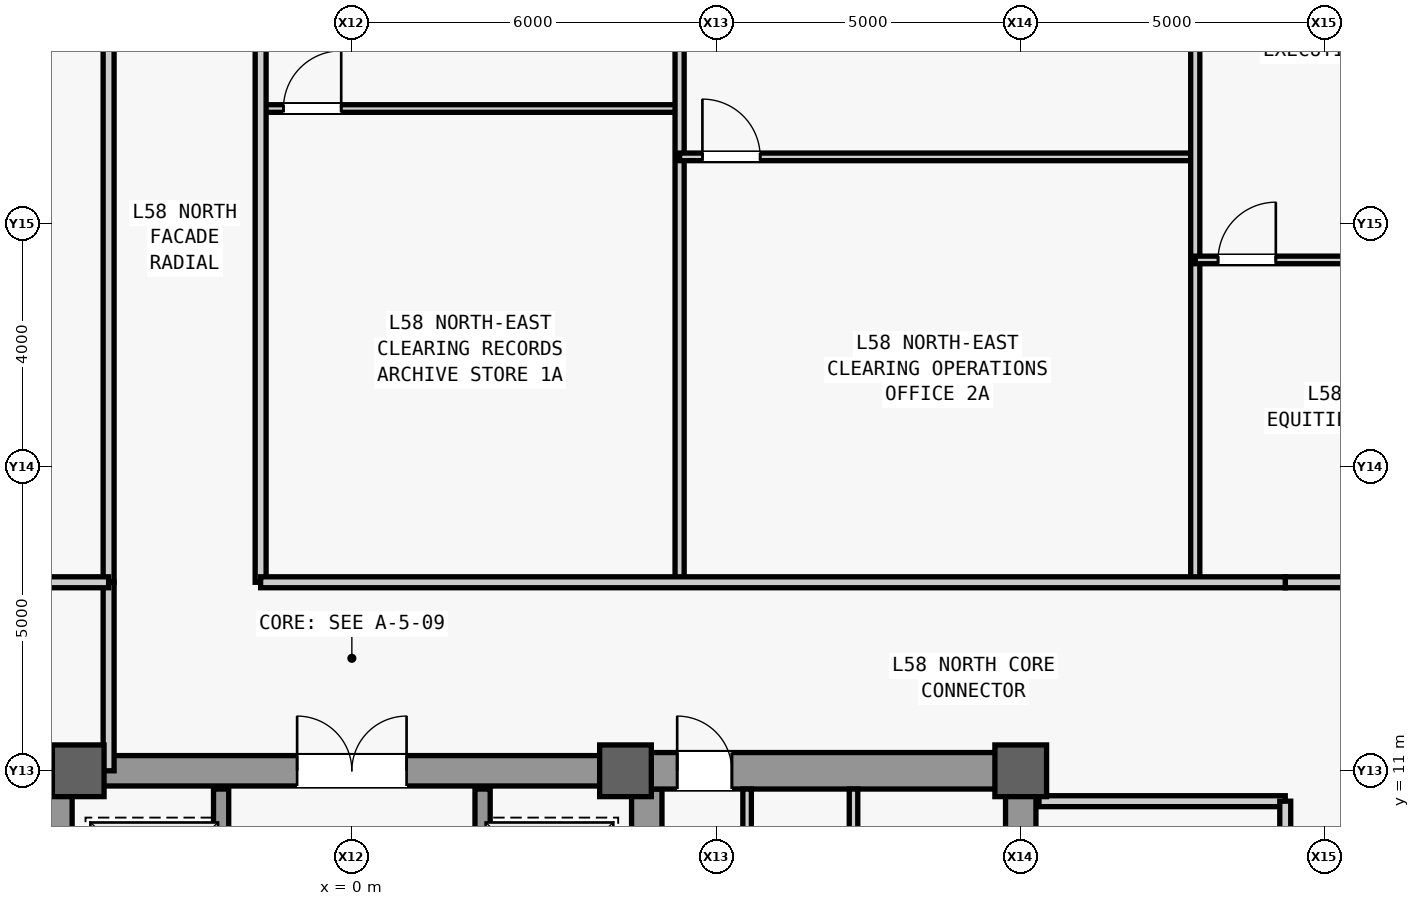
"""IFC4 building model, lengths in metres.
Left out: names, types, materials, properties, quantities, classifications, styles, units other than length and angle.
Written with IfcOpenShell. Run it as: python <this file> out.ifc"""

import sys

from ifc_helpers import new_model, si_unit, direction, frame, frame_2d, origin, origin_2d, place, context, subcontext, project, spatial, rectangle, extrude, source, transform, mapped, element, fill, save


model = new_model("IFC4")
c1 = context("Model", 3, precision=1e-05, world=origin(), true_north=direction((0.0, 1.0)))
c2 = subcontext(c1, "Body", "Model", "MODEL_VIEW")
j1 = project(units=[si_unit("LENGTHUNIT", "METRE"), si_unit("PLANEANGLEUNIT", "RADIAN")], contexts=[c1])
p1 = place(None, origin())
s1 = spatial("IfcSite", under=j1, at=p1, CompositionType="ELEMENT")
p2 = place(p1, origin())
s2 = spatial("IfcBuilding", under=s1, at=p2, CompositionType="ELEMENT")
p3 = place(p2, frame((0.0, 0.0, 247.1)))
s3 = spatial("IfcBuildingStorey", under=s2, at=p3, CompositionType="ELEMENT", Elevation=247.1)
m1 = source(origin(), c2, "Body", "SweptSolid", [
    extrude(rectangle(XDim=22.0, YDim=0.5, at=frame_2d((11.0, 0.0))), origin(), (0.0, 0.0, 1.0), 3.78),
])
p4 = place(p3, frame((11.0, -11.0, 0.0), z_axis=(0.0, 0.0, 1.0), x_axis=(0.0, 1.0, 0.0)))
e1 = element("IfcWall", 1, at=p4, inside=s3, PredefinedType="SHEAR", context=c2, shape_type="MappedRepresentation", body=[
    mapped(m1, transform((0.0, 0.0, 0.0), scale=1.0)),
])
m2 = source(origin(), c2, "Body", "SweptSolid", [
    extrude(rectangle(XDim=1.1, YDim=2.2, at=frame_2d((0.55, 1.1))), frame((0.0, 0.26, 0.0), z_axis=(0.0, -1.0, 0.0), x_axis=(1.0, 0.0, 0.0)), (0.0, 0.0, 1.0), 0.52),
])
p5 = place(p4, frame((0.8, 0.0, 0.0)))
e2 = element("IfcOpeningElement", 2, at=p5, cuts=e1, PredefinedType="OPENING", context=c2, shape_type="MappedRepresentation", body=[
    mapped(m2, transform((0.0, 0.0, 0.0), scale=1.0)),
])
m3 = source(origin(), c2, "Body", "SweptSolid", [
    extrude(rectangle(XDim=0.9, YDim=2.15, at=frame_2d((0.45, 1.075))), frame((0.0, 0.26, 0.0), z_axis=(0.0, -1.0, 0.0), x_axis=(1.0, 0.0, 0.0)), (0.0, 0.0, 1.0), 0.52),
])
p6 = place(p4, frame((7.575, 0.0, 0.0)))
e3 = element("IfcOpeningElement", 3, at=p6, cuts=e1, PredefinedType="OPENING", context=c2, shape_type="MappedRepresentation", body=[
    mapped(m3, transform((0.0, 0.0, 0.0), scale=1.0)),
])
m4 = source(origin(), c2, "Body", "SweptSolid", [
    extrude(rectangle(XDim=1.3, YDim=2.3, at=frame_2d((0.65, 1.15))), frame((0.0, 0.26, 0.0), z_axis=(0.0, -1.0, 0.0), x_axis=(1.0, 0.0, 0.0)), (0.0, 0.0, 1.0), 0.52),
])
p7 = place(p4, frame((2.7, 0.0, 0.0)))
e4 = element("IfcOpeningElement", 4, at=p7, cuts=e1, PredefinedType="OPENING", context=c2, shape_type="MappedRepresentation", body=[
    mapped(m4, transform((0.0, 0.0, 0.0), scale=1.0)),
])
p8 = place(p4, frame((13.35, 0.0, 0.0)))
e5 = element("IfcOpeningElement", 5, at=p8, cuts=e1, PredefinedType="OPENING", context=c2, shape_type="MappedRepresentation", body=[
    mapped(m4, transform((0.0, 0.0, 0.0), scale=1.0)),
])
m5 = source(origin(), c2, "Body", "SweptSolid", [
    extrude(rectangle(XDim=21.4, YDim=0.5, at=frame_2d((10.7, 0.0))), origin(), (0.0, 0.0, 1.0), 3.78),
])
for number, where, z_axis, x_axis in (
    (6, (-4.85, -10.7, 0.0), (0.0, 0.0, 1.0), (0.0, 1.0, 0.0)),
    (7, (4.85, -10.7, 0.0), (0.0, 0.0, 1.0), (0.0, 1.0, 0.0)),
):
    element("IfcWall", number, at=place(p3, frame(where, z_axis=z_axis, x_axis=x_axis)), inside=s3, PredefinedType="SHEAR", context=c2, shape_type="MappedRepresentation", body=[
        mapped(m5, transform((0.0, 0.0, 0.0), scale=1.0)),
    ])
m6 = source(origin(), c2, "Body", "SweptSolid", [
    extrude(rectangle(XDim=5.9, YDim=0.6, at=frame_2d((2.95, 0.0))), origin(), (0.0, 0.0, 1.0), 3.78),
])
p9 = place(p3, frame((-10.75, 11.0, 0.0), z_axis=(0.0, 0.0, 1.0), x_axis=(1.0, 0.0, 0.0)))
e8 = element("IfcWall", 8, at=p9, inside=s3, PredefinedType="SHEAR", context=c2, shape_type="MappedRepresentation", body=[
    mapped(m6, transform((0.0, 0.0, 0.0), scale=1.0)),
])
p10 = place(p3, frame((4.85, 11.0, 0.0), z_axis=(0.0, 0.0, 1.0), x_axis=(1.0, 0.0, 0.0)))
e9 = element("IfcWall", 9, at=p10, inside=s3, PredefinedType="SHEAR", context=c2, shape_type="MappedRepresentation", body=[
    mapped(m6, transform((0.0, 0.0, 0.0), scale=1.0)),
])
m7 = source(origin(), c2, "Body", "SweptSolid", [
    extrude(rectangle(XDim=0.9, YDim=2.15, at=frame_2d((0.45, 1.075))), frame((0.0, 0.31, 0.0), z_axis=(0.0, -1.0, 0.0), x_axis=(1.0, 0.0, 0.0)), (0.0, 0.0, 1.0), 0.62),
])
p11 = place(p10, frame((0.5, 0.0, 0.0)))
e10 = element("IfcOpeningElement", 10, at=p11, cuts=e9, PredefinedType="OPENING", context=c2, shape_type="MappedRepresentation", body=[
    mapped(m7, transform((0.0, 0.0, 0.0), scale=1.0)),
])
m8 = source(origin(), c2, "Body", "SweptSolid", [
    extrude(rectangle(XDim=9.2, YDim=0.5, at=frame_2d((4.6, 0.0))), origin(), (0.0, 0.0, 1.0), 3.78),
])
p12 = place(p3, frame((-4.6, 11.0, 0.0), z_axis=(0.0, 0.0, 1.0), x_axis=(1.0, 0.0, 0.0)))
e11 = element("IfcWall", 11, at=p12, inside=s3, PredefinedType="SHEAR", context=c2, shape_type="MappedRepresentation", body=[
    mapped(m8, transform((0.0, 0.0, 0.0), scale=1.0)),
])
m9 = source(origin(), c2, "Body", "SweptSolid", [
    extrude(rectangle(XDim=1.8, YDim=2.25, at=frame_2d((0.9, 1.125))), frame((0.0, 0.26, 0.0), z_axis=(0.0, -1.0, 0.0), x_axis=(1.0, 0.0, 0.0)), (0.0, 0.0, 1.0), 0.52),
])
p13 = place(p12, frame((3.7, 0.0, 0.0)))
e12 = element("IfcOpeningElement", 12, at=p13, cuts=e11, PredefinedType="OPENING", context=c2, shape_type="MappedRepresentation", body=[
    mapped(m9, transform((0.0, 0.0, 0.0), scale=1.0)),
])
m10 = source(origin(), c2, "Body", "SweptSolid", [
    extrude(rectangle(XDim=0.85, YDim=0.85, at=origin_2d()), origin(), (0.0, 0.0, 1.0), 4.0),
])
for number, where, z_axis, x_axis in (
    (13, (-4.5, 11.0, 0.0), (0.0, 0.0, 1.0), (1.0, 0.0, 0.0)),
    (14, (4.5, 11.0, 0.0), (0.0, 0.0, 1.0), (1.0, 0.0, 0.0)),
    (15, (11.0, 11.0, 0.0), (0.0, 0.0, 1.0), (1.0, 0.0, 0.0)),
):
    element("IfcColumn", number, at=place(p3, frame(where, z_axis=z_axis, x_axis=x_axis)), inside=s3, PredefinedType="COLUMN", context=c2, shape_type="MappedRepresentation", body=[
        mapped(m10, transform((0.0, 0.0, 0.0), scale=1.0)),
    ])
m11 = source(origin(), c2, "Body", "SweptSolid", [
    extrude(rectangle(XDim=9.4, YDim=0.14, at=frame_2d((4.7, 0.0))), origin(), (0.0, 0.0, 1.0), 3.78),
])
p14 = place(p3, frame((8.25, 1.3, 0.0), z_axis=(0.0, 0.0, 1.0), x_axis=(0.0, 1.0, 0.0)))
e16 = element("IfcWall", 16, at=p14, inside=s3, PredefinedType="PARTITIONING", context=c2, shape_type="MappedRepresentation", body=[
    mapped(m11, transform((0.0, 0.0, 0.0), scale=1.0)),
])
m12 = source(origin(), c2, "Body", "SweptSolid", [
    extrude(rectangle(XDim=5.7, YDim=0.14, at=frame_2d((2.85, 0.0))), origin(), (0.0, 0.0, 1.0), 3.78),
])
p15 = place(p3, frame((6.5, 5.0, 0.0), z_axis=(0.0, 0.0, 1.0), x_axis=(0.0, 1.0, 0.0)))
e17 = element("IfcWall", 17, at=p15, inside=s3, PredefinedType="PARTITIONING", context=c2, shape_type="MappedRepresentation", body=[
    mapped(m12, transform((0.0, 0.0, 0.0), scale=1.0)),
])
m13 = source(origin(), c2, "Body", "SweptSolid", [
    extrude(rectangle(XDim=0.9, YDim=2.15, at=frame_2d((0.45, 1.075))), frame((0.0, 0.08, 0.0), z_axis=(0.0, -1.0, 0.0), x_axis=(1.0, 0.0, 0.0)), (0.0, 0.0, 1.0), 0.16),
])
p16 = place(p15, frame((2.05, 0.0, 0.0)))
e18 = element("IfcOpeningElement", 18, at=p16, cuts=e17, PredefinedType="OPENING", context=c2, shape_type="MappedRepresentation", body=[
    mapped(m13, transform((0.0, 0.0, 0.0), scale=1.0)),
])
m14 = source(origin(), c2, "Body", "SweptSolid", [
    extrude(rectangle(XDim=4.05, YDim=0.18, at=frame_2d((2.025, 0.0))), origin(), (0.0, 0.0, 1.0), 3.78),
])
p17 = place(p3, frame((11.3, 10.5, 0.0), z_axis=(0.0, 0.0, 1.0), x_axis=(1.0, 0.0, 0.0)))
e19 = element("IfcWall", 19, at=p17, inside=s3, PredefinedType="PARTITIONING", context=c2, shape_type="MappedRepresentation", body=[
    mapped(m14, transform((0.0, 0.0, 0.0), scale=1.0)),
])
m15 = source(origin(), c2, "Body", "SweptSolid", [
    extrude(rectangle(XDim=16.6, YDim=0.18, at=frame_2d((8.3, 0.0))), origin(), (0.0, 0.0, 1.0), 3.78),
])
p18 = place(p3, frame((15.35, -6.1, 0.0), z_axis=(0.0, 0.0, 1.0), x_axis=(0.0, 1.0, 0.0)))
e20 = element("IfcWall", 20, at=p18, inside=s3, PredefinedType="PARTITIONING", context=c2, shape_type="MappedRepresentation", body=[
    mapped(m15, transform((0.0, 0.0, 0.0), scale=1.0)),
])
m16 = source(origin(), c2, "Body", "SweptSolid", [
    extrude(rectangle(XDim=1.8, YDim=2.25, at=frame_2d((0.9, 1.125))), frame((0.0, 0.1, 0.0), z_axis=(0.0, -1.0, 0.0), x_axis=(1.0, 0.0, 0.0)), (0.0, 0.0, 1.0), 0.2),
])
p19 = place(p18, frame((2.7, 0.0, 0.0)))
e21 = element("IfcOpeningElement", 21, at=p19, cuts=e20, PredefinedType="OPENING", context=c2, shape_type="MappedRepresentation", body=[
    mapped(m16, transform((0.0, 0.0, 0.0), scale=1.0)),
])
p20 = place(p18, frame((13.0, 0.0, 0.0)))
e22 = element("IfcOpeningElement", 22, at=p20, cuts=e20, PredefinedType="OPENING", context=c2, shape_type="MappedRepresentation", body=[
    mapped(m16, transform((0.0, 0.0, 0.0), scale=1.0)),
])
m17 = source(origin(), c2, "Body", "SweptSolid", [
    extrude(rectangle(XDim=5.4, YDim=0.25, at=frame_2d((2.7, 0.0))), origin(), (0.0, 0.0, 1.0), 3.78),
])
p21 = place(p3, frame((-2.15, 5.3, 0.0), z_axis=(0.0, 0.0, 1.0), x_axis=(0.0, 1.0, 0.0)))
e23 = element("IfcWall", 23, at=p21, inside=s3, PredefinedType="SHEAR", context=c2, shape_type="MappedRepresentation", body=[
    mapped(m17, transform((0.0, 0.0, 0.0), scale=1.0)),
])
m18 = source(origin(), c2, "Body", "SweptSolid", [
    extrude(rectangle(XDim=1.2, YDim=2.3, at=frame_2d((0.6, 1.15))), frame((0.0, 0.135, 0.0), z_axis=(0.0, -1.0, 0.0), x_axis=(1.0, 0.0, 0.0)), (0.0, 0.0, 1.0), 0.27),
])
p22 = place(p21, frame((3.3, 0.0, 0.0)))
e24 = element("IfcOpeningElement", 24, at=p22, cuts=e23, PredefinedType="OPENING", context=c2, shape_type="MappedRepresentation", body=[
    mapped(m18, transform((0.0, 0.0, 0.0), scale=1.0)),
])
p23 = place(p21, frame((0.9, 0.0, 0.0)))
e25 = element("IfcOpeningElement", 25, at=p23, cuts=e23, PredefinedType="OPENING", context=c2, shape_type="MappedRepresentation", body=[
    mapped(m18, transform((0.0, 0.0, 0.0), scale=1.0)),
])
p24 = place(p3, frame((2.15, 5.3, 0.0), z_axis=(0.0, 0.0, 1.0), x_axis=(0.0, 1.0, 0.0)))
e26 = element("IfcWall", 26, at=p24, inside=s3, PredefinedType="SHEAR", context=c2, shape_type="MappedRepresentation", body=[
    mapped(m17, transform((0.0, 0.0, 0.0), scale=1.0)),
])
p25 = place(p24, frame((3.3, 0.0, 0.0)))
e27 = element("IfcOpeningElement", 27, at=p25, cuts=e26, PredefinedType="OPENING", context=c2, shape_type="MappedRepresentation", body=[
    mapped(m18, transform((0.0, 0.0, 0.0), scale=1.0)),
])
p26 = place(p24, frame((0.9, 0.0, 0.0)))
e28 = element("IfcOpeningElement", 28, at=p26, cuts=e26, PredefinedType="OPENING", context=c2, shape_type="MappedRepresentation", body=[
    mapped(m18, transform((0.0, 0.0, 0.0), scale=1.0)),
])
m19 = source(origin(), c2, "Body", "SweptSolid", [
    extrude(rectangle(XDim=2.45, YDim=0.18, at=frame_2d((1.225, 0.0))), origin(), (0.0, 0.0, 1.0), 3.78),
])
p27 = place(p3, frame((15.35, 14.1, 0.0), z_axis=(0.0, 0.0, 1.0), x_axis=(1.0, 0.0, 0.0)))
e29 = element("IfcWall", 29, at=p27, inside=s3, PredefinedType="PARTITIONING", context=c2, shape_type="MappedRepresentation", body=[
    mapped(m19, transform((0.0, 0.0, 0.0), scale=1.0)),
])
m20 = source(origin(), c2, "Body", "SweptSolid", [
    extrude(rectangle(XDim=3.1, YDim=0.18, at=frame_2d((1.55, 0.0))), origin(), (0.0, 0.0, 1.0), 3.78),
])
p28 = place(p3, frame((-4.0, 11.0, 0.0), z_axis=(0.0, 0.0, 1.0), x_axis=(0.0, 1.0, 0.0)))
e30 = element("IfcWall", 30, at=p28, inside=s3, PredefinedType="PARTITIONING", context=c2, shape_type="MappedRepresentation", body=[
    mapped(m20, transform((0.0, 0.0, 0.0), scale=1.0)),
])
m21 = source(origin(), c2, "Body", "SweptSolid", [
    extrude(rectangle(XDim=15.9, YDim=0.18, at=frame_2d((7.95, 0.0))), origin(), (0.0, 0.0, 1.0), 3.78),
])
p29 = place(p3, frame((-4.0, 14.1, 0.0), z_axis=(0.0, 0.0, 1.0), x_axis=(0.0, 1.0, 0.0)))
e31 = element("IfcWall", 31, at=p29, inside=s3, PredefinedType="PARTITIONING", context=c2, shape_type="MappedRepresentation", body=[
    mapped(m21, transform((0.0, 0.0, 0.0), scale=1.0)),
])
m22 = source(origin(), c2, "Body", "SweptSolid", [
    extrude(rectangle(XDim=1.05, YDim=2.2, at=frame_2d((0.525, 1.1))), frame((0.0, 0.1, 0.0), z_axis=(0.0, -1.0, 0.0), x_axis=(1.0, 0.0, 0.0)), (0.0, 0.0, 1.0), 0.2),
])
p30 = place(p29, frame((11.4, 0.0, 0.0)))
e32 = element("IfcOpeningElement", 32, at=p30, cuts=e31, PredefinedType="OPENING", context=c2, shape_type="MappedRepresentation", body=[
    mapped(m22, transform((0.0, 0.0, 0.0), scale=1.0)),
])
m23 = source(origin(), c2, "Body", "SweptSolid", [
    extrude(rectangle(XDim=11.35, YDim=0.18, at=frame_2d((5.675, 0.0))), origin(), (0.0, 0.0, 1.0), 3.78),
])
p31 = place(p3, frame((-15.35, 14.1, 0.0), z_axis=(0.0, 0.0, 1.0), x_axis=(1.0, 0.0, 0.0)))
e33 = element("IfcWall", 33, at=p31, inside=s3, PredefinedType="PARTITIONING", context=c2, shape_type="MappedRepresentation", body=[
    mapped(m23, transform((0.0, 0.0, 0.0), scale=1.0)),
])
m24 = source(origin(), c2, "Body", "SweptSolid", [
    extrude(rectangle(XDim=6.89, YDim=0.125, at=frame_2d((3.445, 0.0))), origin(), (0.0, 0.0, 1.0), 3.78),
])
p32 = place(p3, frame((-1.5, 21.891, 0.0), z_axis=(0.0, 0.0, 1.0), x_axis=(1.0, 0.0, 0.0)))
e34 = element("IfcWall", 34, at=p32, inside=s3, PredefinedType="PARTITIONING", context=c2, shape_type="MappedRepresentation", body=[
    mapped(m24, transform((0.0, 0.0, 0.0), scale=1.0)),
])
m25 = source(origin(), c2, "Body", "SweptSolid", [
    extrude(rectangle(XDim=0.95, YDim=2.15, at=frame_2d((0.475, 1.075))), frame((0.0, 0.073, 0.0), z_axis=(0.0, -1.0, 0.0), x_axis=(1.0, 0.0, 0.0)), (0.0, 0.0, 1.0), 0.145),
])
p33 = place(p32, frame((0.375, 0.0, 0.0)))
e35 = element("IfcOpeningElement", 35, at=p33, cuts=e34, PredefinedType="OPENING", context=c2, shape_type="MappedRepresentation", body=[
    mapped(m25, transform((0.0, 0.0, 0.0), scale=1.0)),
])
m26 = source(origin(), c2, "Body", "SweptSolid", [
    extrude(rectangle(XDim=15.9, YDim=0.15, at=frame_2d((7.95, 0.0))), origin(), (0.0, 0.0, 1.0), 3.78),
])
p34 = place(p3, frame((5.39, 14.1, 0.0), z_axis=(0.0, 0.0, 1.0), x_axis=(0.0, 1.0, 0.0)))
e36 = element("IfcWall", 36, at=p34, inside=s3, PredefinedType="PARTITIONING", context=c2, shape_type="MappedRepresentation", body=[
    mapped(m26, transform((0.0, 0.0, 0.0), scale=1.0)),
])
m27 = source(origin(), c2, "Body", "SweptSolid", [
    extrude(rectangle(XDim=0.95, YDim=2.15, at=frame_2d((0.475, 1.075))), frame((0.0, 0.085, 0.0), z_axis=(0.0, -1.0, 0.0), x_axis=(1.0, 0.0, 0.0)), (0.0, 0.0, 1.0), 0.17),
])
p35 = place(p34, frame((11.45, 0.0, 0.0)))
e37 = element("IfcOpeningElement", 37, at=p35, cuts=e36, PredefinedType="OPENING", context=c2, shape_type="MappedRepresentation", body=[
    mapped(m27, transform((0.0, 0.0, 0.0), scale=1.0)),
])
m28 = source(origin(), c2, "Body", "SweptSolid", [
    extrude(rectangle(XDim=8.48, YDim=0.125, at=frame_2d((4.24, 0.0))), origin(), (0.0, 0.0, 1.0), 3.78),
])
p36 = place(p3, frame((5.39, 21.096, 0.0), z_axis=(0.0, 0.0, 1.0), x_axis=(1.0, 0.0, 0.0)))
e38 = element("IfcWall", 38, at=p36, inside=s3, PredefinedType="PARTITIONING", context=c2, shape_type="MappedRepresentation", body=[
    mapped(m28, transform((0.0, 0.0, 0.0), scale=1.0)),
])
p37 = place(p36, frame((0.375, 0.0, 0.0)))
e39 = element("IfcOpeningElement", 39, at=p37, cuts=e38, PredefinedType="OPENING", context=c2, shape_type="MappedRepresentation", body=[
    mapped(m25, transform((0.0, 0.0, 0.0), scale=1.0)),
])
p38 = place(p3, frame((13.87, 14.1, 0.0), z_axis=(0.0, 0.0, 1.0), x_axis=(0.0, 1.0, 0.0)))
e40 = element("IfcWall", 40, at=p38, inside=s3, PredefinedType="PARTITIONING", context=c2, shape_type="MappedRepresentation", body=[
    mapped(m26, transform((0.0, 0.0, 0.0), scale=1.0)),
])
p39 = place(p38, frame((11.45, 0.0, 0.0)))
e41 = element("IfcOpeningElement", 41, at=p39, cuts=e40, PredefinedType="OPENING", context=c2, shape_type="MappedRepresentation", body=[
    mapped(m27, transform((0.0, 0.0, 0.0), scale=1.0)),
])
m29 = source(origin(), c2, "Body", "SweptSolid", [
    extrude(rectangle(XDim=6.36, YDim=0.125, at=frame_2d((3.18, 0.0))), origin(), (0.0, 0.0, 1.0), 3.363),
])
p40 = place(p3, frame((13.87, 19.401, 0.0), z_axis=(0.0, 0.0, 1.0), x_axis=(1.0, 0.0, 0.0)))
e42 = element("IfcWall", 42, at=p40, inside=s3, PredefinedType="PARTITIONING", context=c2, shape_type="MappedRepresentation", body=[
    mapped(m29, transform((0.0, 0.0, 0.0), scale=1.0)),
])
p41 = place(p40, frame((0.375, 0.0, 0.0)))
e43 = element("IfcOpeningElement", 43, at=p41, cuts=e42, PredefinedType="OPENING", context=c2, shape_type="MappedRepresentation", body=[
    mapped(m25, transform((0.0, 0.0, 0.0), scale=1.0)),
])
p42 = place(p3, frame((-1.5, 14.1, 0.0), z_axis=(0.0, 0.0, 1.0), x_axis=(0.0, 1.0, 0.0)))
e44 = element("IfcWall", 44, at=p42, inside=s3, PredefinedType="PARTITIONING", context=c2, shape_type="MappedRepresentation", body=[
    mapped(m21, transform((0.0, 0.0, 0.0), scale=1.0)),
])
p43 = place(p42, frame((11.4, 0.0, 0.0)))
e45 = element("IfcOpeningElement", 45, at=p43, cuts=e44, PredefinedType="OPENING", context=c2, shape_type="MappedRepresentation", body=[
    mapped(m22, transform((0.0, 0.0, 0.0), scale=1.0)),
])
m30 = source(origin(), c2, "Body", "SweptSolid", [
    extrude(rectangle(XDim=16.85, YDim=0.18, at=frame_2d((8.425, 0.0))), origin(), (0.0, 0.0, 1.0), 3.78),
])
p44 = place(p3, frame((-1.5, 14.1, 0.0), z_axis=(0.0, 0.0, 1.0), x_axis=(1.0, 0.0, 0.0)))
e46 = element("IfcWall", 46, at=p44, inside=s3, PredefinedType="PARTITIONING", context=c2, shape_type="MappedRepresentation", body=[
    mapped(m30, transform((0.0, 0.0, 0.0), scale=1.0)),
])
m31 = source(origin(), c2, "Body", "SweptSolid", [
    extrude(rectangle(XDim=0.9, YDim=2.15, at=frame_2d((0.45, 1.075))), frame((0.0, 0.025, 0.0), z_axis=(0.0, -1.0, 0.0), x_axis=(1.0, 0.0, 0.0)), (0.0, 0.0, 1.0), 0.05),
])
p45 = place(p11, origin())
e47 = element("IfcDoor", 47, at=p45, inside=s3, OperationType="SINGLE_SWING_LEFT", PredefinedType="DOOR", context=c2, shape_type="MappedRepresentation", body=[
    mapped(m31, transform((0.0, 0.0, 0.0), scale=1.0)),
])
fill(e10, e47)
m32 = source(origin(), c2, "Body", "SweptSolid", [
    extrude(rectangle(XDim=1.8, YDim=2.25, at=frame_2d((0.9, 1.125))), frame((0.0, 0.025, 0.0), z_axis=(0.0, -1.0, 0.0), x_axis=(1.0, 0.0, 0.0)), (0.0, 0.0, 1.0), 0.05),
])
p46 = place(p13, origin())
e48 = element("IfcDoor", 48, at=p46, inside=s3, OperationType="SINGLE_SWING_RIGHT", PredefinedType="DOOR", context=c2, shape_type="MappedRepresentation", body=[
    mapped(m32, transform((0.0, 0.0, 0.0), scale=1.0)),
])
fill(e12, e48)
m33 = source(origin(), c2, "Body", "SweptSolid", [
    extrude(rectangle(XDim=0.95, YDim=2.15, at=frame_2d((0.475, 1.075))), frame((0.0, 0.025, 0.0), z_axis=(0.0, -1.0, 0.0), x_axis=(1.0, 0.0, 0.0)), (0.0, 0.0, 1.0), 0.05),
])
p47 = place(p33, origin())
e49 = element("IfcDoor", 49, at=p47, inside=s3, OperationType="SINGLE_SWING_RIGHT", PredefinedType="DOOR", context=c2, shape_type="MappedRepresentation", body=[
    mapped(m33, transform((0.0, 0.0, 0.0), scale=1.0)),
])
fill(e35, e49)
p48 = place(p37, origin())
e50 = element("IfcDoor", 50, at=p48, inside=s3, OperationType="SINGLE_SWING_LEFT", PredefinedType="DOOR", context=c2, shape_type="MappedRepresentation", body=[
    mapped(m33, transform((0.0, 0.0, 0.0), scale=1.0)),
])
fill(e39, e50)
p49 = place(p41, origin())
e51 = element("IfcDoor", 51, at=p49, inside=s3, OperationType="SINGLE_SWING_RIGHT", PredefinedType="DOOR", context=c2, shape_type="MappedRepresentation", body=[
    mapped(m33, transform((0.0, 0.0, 0.0), scale=1.0)),
])
fill(e43, e51)
save(model, sys.argv[1])
